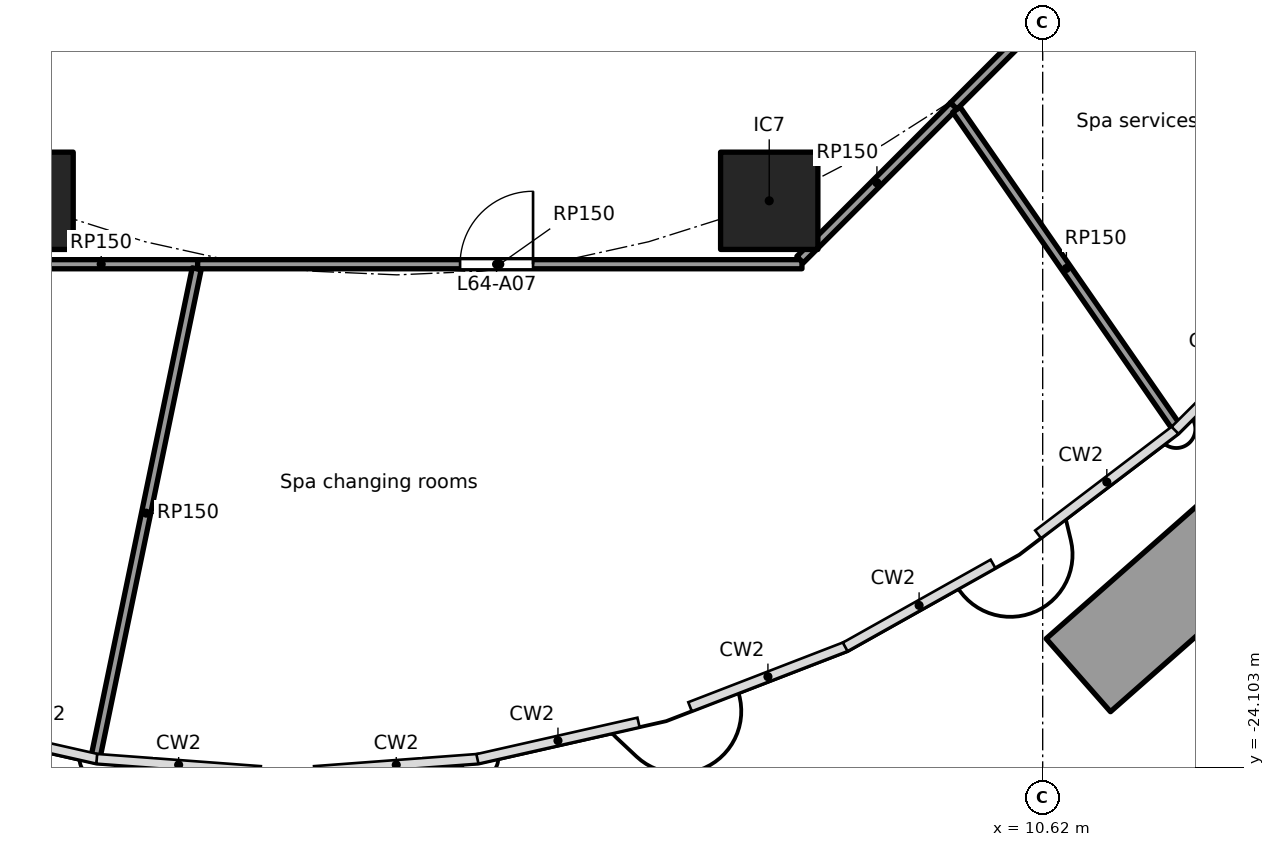
"""IFC4 building model, lengths in metres.
Left out: names, types, materials, properties, quantities, classifications, styles, units other than length and angle.
Written with IfcOpenShell. Run it as: python <this file> out.ifc"""

import sys

from ifc_helpers import new_model, si_unit, direction, frame, frame_2d, origin, origin_2d, place, context, subcontext, project, spatial, rectangle, extrude, element, fill, save


model = new_model("IFC4")
c1 = context("Model", 3, precision=1e-05, world=origin(), true_north=direction((0.0, 1.0)))
c2 = subcontext(c1, "Body", "Model", "MODEL_VIEW")
j1 = project(units=[si_unit("LENGTHUNIT", "METRE"), si_unit("PLANEANGLEUNIT", "RADIAN")], contexts=[c1])
p1 = place(None, origin())
s1 = spatial("IfcSite", under=j1, at=p1, CompositionType="ELEMENT")
p2 = place(p1, origin())
s2 = spatial("IfcBuilding", under=s1, at=p2, CompositionType="ELEMENT")
p3 = place(p2, frame((0.0, 0.0, 252.9)))
s3 = spatial("IfcBuildingStorey", under=s2, at=p3, CompositionType="ELEMENT", Elevation=252.9)
for number, where, z_axis, x_axis in (
    (1, (-6.123, -14.782, 0.0), (0.0, 0.0, 1.0), (1.0, 0.0, 0.0)),
    (2, (6.123, -14.782, 0.0), (0.0, 0.0, 1.0), (1.0, 0.0, 0.0)),
):
    element("IfcColumn", number, at=place(p3, frame(where, z_axis=z_axis, x_axis=x_axis)), inside=s3, PredefinedType="COLUMN", context=c2, shape_type="SweptSolid", body=[
        extrude(rectangle(XDim=1.6, YDim=1.6, at=origin_2d()), origin(), (0.0, 0.0, 1.0), 5.6),
    ])
p4 = place(p3, frame((11.206, -22.583, 0.0), z_axis=(0.0, 0.0, 1.0), x_axis=(0.75035522749, 0.66103481949, 0.0)))
e3 = element("IfcWall", 3, at=p4, inside=s3, PredefinedType="SOLIDWALL", context=c2, shape_type="SweptSolid", body=[
    extrude(rectangle(XDim=7.653, YDim=1.6, at=frame_2d((3.827, 0.0))), origin(), (0.0, 0.0, 1.0), 1.1),
])
p5 = place(p3, frame((-3.277, -15.825, 0.0), z_axis=(0.0, 0.0, 1.0), x_axis=(-1.0, 0.0, 0.0)))
e4 = element("IfcWall", 4, at=p5, inside=s3, PredefinedType="PARTITIONING", context=c2, shape_type="SweptSolid", body=[
    extrude(rectangle(XDim=3.172, YDim=0.15, at=frame_2d((1.586, 0.0))), origin(), (0.0, 0.0, 1.0), 5.34),
])
p6 = place(p3, frame((-3.292, -15.9, 0.0), z_axis=(0.0, 0.0, 1.0), x_axis=(-0.202759053946, -0.979228658712, 0.0)))
e5 = element("IfcWall", 5, at=p6, inside=s3, PredefinedType="PARTITIONING", context=c2, shape_type="SweptSolid", body=[
    extrude(rectangle(XDim=8.207, YDim=0.15, at=frame_2d((4.104, 0.0))), origin(), (0.0, 0.0, 1.0), 5.34),
])
p7 = place(p3, frame((6.661, -15.825, 0.0), z_axis=(0.0, 0.0, 1.0), x_axis=(-1.0, 0.0, 0.0)))
e6 = element("IfcWall", 6, at=p7, inside=s3, PredefinedType="PARTITIONING", context=c2, shape_type="SweptSolid", body=[
    extrude(rectangle(XDim=9.938, YDim=0.15, at=frame_2d((4.969, 0.0))), origin(), (0.0, 0.0, 1.0), 5.34),
])
p8 = place(p7, frame((4.422, 0.0, 0.0)))
e7 = element("IfcOpeningElement", 7, at=p8, cuts=e6, PredefinedType="OPENING", context=c2, shape_type="SweptSolid", body=[
    extrude(rectangle(XDim=1.2, YDim=2.1, at=frame_2d((0.6, 1.05))), frame((0.0, 0.085, 0.0), z_axis=(0.0, -1.0, 0.0), x_axis=(1.0, 0.0, 0.0)), (0.0, 0.0, 1.0), 0.17),
])
p9 = place(p3, frame((9.158, -13.221, 0.0), z_axis=(0.0, 0.0, 1.0), x_axis=(-0.706970221364, -0.707243314641, 0.0)))
e8 = element("IfcWall", 8, at=p9, inside=s3, PredefinedType="PARTITIONING", context=c2, shape_type="SweptSolid", body=[
    extrude(rectangle(XDim=3.576, YDim=0.15, at=frame_2d((1.788, 0.0))), origin(), (0.0, 0.0, 1.0), 5.34),
])
p10 = place(p3, frame((9.201, -13.284, 0.0), z_axis=(0.0, 0.0, 1.0), x_axis=(0.569459783046, -0.822019194115, 0.0)))
e9 = element("IfcWall", 9, at=p10, inside=s3, PredefinedType="PARTITIONING", context=c2, shape_type="SweptSolid", body=[
    extrude(rectangle(XDim=6.352, YDim=0.15, at=frame_2d((3.176, 0.0))), origin(), (0.0, 0.0, 1.0), 5.34),
])
p11 = place(p3, frame((15.9, -6.48, 0.0), z_axis=(0.0, 0.0, 1.0), x_axis=(-0.70715799483, -0.707055563833, 0.0)))
e10 = element("IfcWall", 10, at=p11, inside=s3, PredefinedType="PARTITIONING", context=c2, shape_type="SweptSolid", body=[
    extrude(rectangle(XDim=9.534, YDim=0.15, at=frame_2d((4.767, 0.0))), origin(), (0.0, 0.0, 1.0), 5.34),
])
p12 = place(p11, frame((4.37, 0.0, 0.0)))
e11 = element("IfcOpeningElement", 11, at=p12, cuts=e10, PredefinedType="OPENING", context=c2, shape_type="SweptSolid", body=[
    extrude(rectangle(XDim=0.9, YDim=2.1, at=frame_2d((0.45, 1.05))), frame((0.0, 0.085, 0.0), z_axis=(0.0, -1.0, 0.0), x_axis=(1.0, 0.0, 0.0)), (0.0, 0.0, 1.0), 0.17),
])
p13 = place(p8, frame((1.2, 0.0, 0.0), x_axis=(-1.0, 0.0, 0.0)))
e12 = element("IfcDoor", 12, at=p13, inside=s3, OperationType="SINGLE_SWING_RIGHT", PredefinedType="DOOR", context=c2, shape_type="SweptSolid", body=[
    extrude(rectangle(XDim=1.2, YDim=2.1, at=frame_2d((0.6, 1.05))), frame((0.0, 0.025, 0.0), z_axis=(0.0, -1.0, 0.0), x_axis=(1.0, 0.0, 0.0)), (0.0, 0.0, 1.0), 0.05),
])
fill(e7, e12)
save(model, sys.argv[1])
